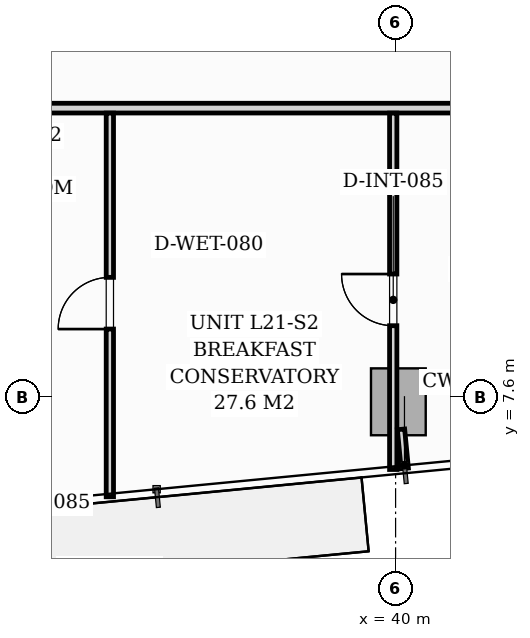
"""IFC4 building model, lengths in metres.
Left out: names, types, materials, properties, quantities, classifications, styles, units other than length and angle.
Written with IfcOpenShell. Run it as: python <this file> out.ifc"""

import sys

from ifc_helpers import new_model, si_unit, direction, frame, frame_2d, origin, origin_2d, place, context, subcontext, project, spatial, rectangle, extrude, source, transform, mapped, element, fill, save


model = new_model("IFC4")
c1 = context("Model", 3, precision=1e-05, world=origin(), true_north=direction((0.0, 1.0)))
c2 = subcontext(c1, "Body", "Model", "MODEL_VIEW")
j1 = project(units=[si_unit("LENGTHUNIT", "METRE"), si_unit("PLANEANGLEUNIT", "RADIAN")], contexts=[c1])
p1 = place(None, origin())
s1 = spatial("IfcSite", under=j1, at=p1, CompositionType="ELEMENT")
p2 = place(p1, origin())
s2 = spatial("IfcBuilding", under=s1, at=p2, CompositionType="ELEMENT")
p3 = place(p2, frame((0.0, 0.0, 77.8)))
s3 = spatial("IfcBuildingStorey", under=s2, at=p3, CompositionType="ELEMENT", Elevation=77.8)
m1 = source(origin(), c2, "Body", "SweptSolid", [
    extrude(rectangle(XDim=0.9, YDim=1.1, at=origin_2d()), origin(), (0.0, 0.0, 1.0), 3.194),
])
p4 = place(p3, frame((40.045, 7.521, 0.004), z_axis=(0.0, 0.0, 1.0), x_axis=(0.995396198367, 0.09584575252, 0.0)))
e1 = element("IfcColumn", 1, at=p4, inside=s3, PredefinedType="COLUMN", context=c2, shape_type="MappedRepresentation", body=[
    mapped(m1, transform((0.0, 0.0, 0.0), scale=1.0)),
])
p5 = place(p3, frame((16.6, 12.35, 0.0), z_axis=(0.0, 0.0, 1.0), x_axis=(1.0, 0.0, 0.0)))
e2 = element("IfcWall", 2, at=p5, inside=s3, PredefinedType="PARTITIONING", context=c2, shape_type="SweptSolid", body=[
    extrude(rectangle(XDim=37.6, YDim=0.16, at=frame_2d((18.8, 0.0))), origin(), (0.0, 0.0, 1.0), 2.94),
])
p6 = place(p5, frame((2.091, 0.0, 0.0)))
e3 = element("IfcOpeningElement", 3, at=p6, cuts=e2, PredefinedType="OPENING", context=c2, shape_type="SweptSolid", body=[
    extrude(rectangle(XDim=0.95, YDim=2.06, at=frame_2d((0.475, 1.03))), frame((0.0, 0.09, 0.0), z_axis=(0.0, -1.0, 0.0), x_axis=(1.0, 0.0, 0.0)), (0.0, 0.0, 1.0), 0.18),
])
p7 = place(p5, frame((26.146, 0.0, 0.0)))
e4 = element("IfcOpeningElement", 4, at=p7, cuts=e2, PredefinedType="OPENING", context=c2, shape_type="SweptSolid", body=[
    extrude(rectangle(XDim=0.95, YDim=2.06, at=frame_2d((0.475, 1.03))), frame((0.0, 0.09, 0.0), z_axis=(0.0, -1.0, 0.0), x_axis=(1.0, 0.0, 0.0)), (0.0, 0.0, 1.0), 0.18),
])
p8 = place(p3, frame((35.301, 5.958, 0.0), z_axis=(0.0, 0.0, 1.0), x_axis=(0.0, 1.0, 0.0)))
e5 = element("IfcWall", 5, at=p8, inside=s3, PredefinedType="PARTITIONING", context=c2, shape_type="SweptSolid", body=[
    extrude(rectangle(XDim=6.31, YDim=0.12, at=frame_2d((3.155, 0.0))), origin(), (0.0, 0.0, 1.0), 2.94),
])
p9 = place(p8, frame((2.758, 0.0, 0.0)))
e6 = element("IfcOpeningElement", 6, at=p9, cuts=e5, PredefinedType="OPENING", context=c2, shape_type="SweptSolid", body=[
    extrude(rectangle(XDim=0.85, YDim=2.05, at=frame_2d((0.425, 1.025))), frame((0.0, 0.07, 0.0), z_axis=(0.0, -1.0, 0.0), x_axis=(1.0, 0.0, 0.0)), (0.0, 0.0, 1.0), 0.14),
])
p10 = place(p3, frame((39.961, 6.407, 0.0), z_axis=(0.0, 0.0, 1.0), x_axis=(0.0, 1.0, 0.0)))
e7 = element("IfcWall", 7, at=p10, inside=s3, PredefinedType="PARTITIONING", context=c2, shape_type="SweptSolid", body=[
    extrude(rectangle(XDim=5.861, YDim=0.12, at=frame_2d((2.93, 0.0))), origin(), (0.0, 0.0, 1.0), 2.94),
])
p11 = place(p10, frame((2.365, 0.0, 0.0)))
e8 = element("IfcOpeningElement", 8, at=p11, cuts=e7, PredefinedType="OPENING", context=c2, shape_type="SweptSolid", body=[
    extrude(rectangle(XDim=0.85, YDim=2.05, at=frame_2d((0.425, 1.025))), frame((0.0, 0.07, 0.0), z_axis=(0.0, -1.0, 0.0), x_axis=(1.0, 0.0, 0.0)), (0.0, 0.0, 1.0), 0.14),
])
p12 = place(p3, frame((40.089, 7.067, 0.0), z_axis=(0.0, 0.0, 1.0), x_axis=(0.095791766065, -0.995401395194, 0.0)))
e9 = element("IfcWall", 9, at=p12, inside=s3, PredefinedType="PARTITIONING", context=c2, shape_type="SweptSolid", body=[
    extrude(rectangle(XDim=0.645, YDim=0.12, at=frame_2d((0.322, 0.0))), origin(), (0.0, 0.0, 1.0), 2.94),
])
m2 = source(origin(), c2, "Body", "SweptSolid", [
    extrude(rectangle(XDim=0.85, YDim=2.05, at=frame_2d((0.425, 1.025))), frame((0.0, 0.025, 0.0), z_axis=(0.0, -1.0, 0.0), x_axis=(1.0, 0.0, 0.0)), (0.0, 0.0, 1.0), 0.05),
])
p13 = place(p9, origin())
e10 = element("IfcDoor", 10, at=p13, inside=s3, OperationType="SINGLE_SWING_LEFT", PredefinedType="DOOR", context=c2, shape_type="MappedRepresentation", body=[
    mapped(m2, transform((0.0, 0.0, 0.0), scale=1.0)),
])
fill(e6, e10)
p14 = place(p11, origin())
e11 = element("IfcDoor", 11, at=p14, inside=s3, OperationType="SINGLE_SWING_RIGHT", PredefinedType="DOOR", context=c2, shape_type="MappedRepresentation", body=[
    mapped(m2, transform((0.0, 0.0, 0.0), scale=1.0)),
])
fill(e8, e11)
save(model, sys.argv[1])
